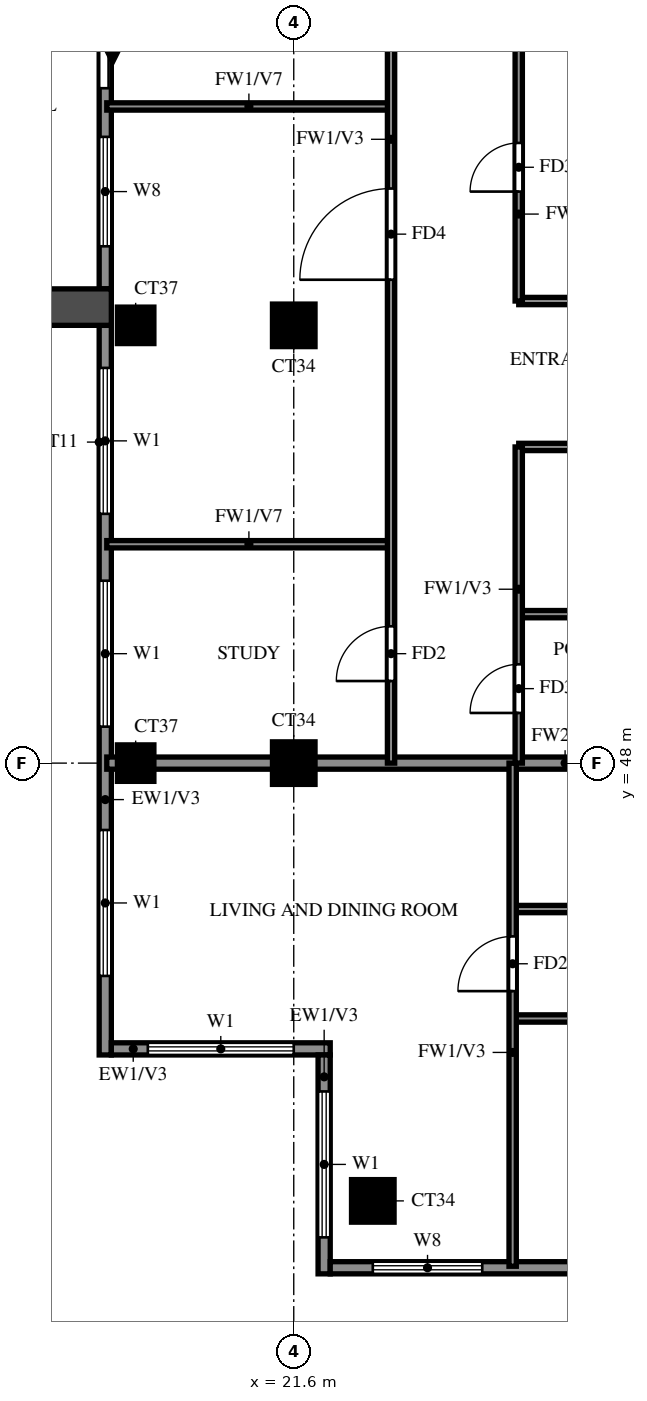
"""IFC4 building model, lengths in metres.
Left out: names, types, materials, properties, quantities, classifications, styles, units other than length and angle.
Written with IfcOpenShell. Run it as: python <this file> out.ifc"""

import sys

from ifc_helpers import new_model, si_unit, direction, frame, frame_2d, origin, origin_2d, place, context, subcontext, project, spatial, rectangle, extrude, source, transform, mapped, element, fill, save


model = new_model("IFC4")
c1 = context("Model", 3, precision=1e-05, world=origin(), true_north=direction((0.0, 1.0)))
c2 = subcontext(c1, "Body", "Model", "MODEL_VIEW")
j1 = project(units=[si_unit("LENGTHUNIT", "METRE"), si_unit("PLANEANGLEUNIT", "RADIAN")], contexts=[c1])
p1 = place(None, origin())
s1 = spatial("IfcSite", under=j1, at=p1, CompositionType="ELEMENT")
p2 = place(p1, origin())
s2 = spatial("IfcBuilding", under=s1, at=p2, CompositionType="ELEMENT")
p3 = place(p2, frame((0.0, 0.0, 264.0)))
s3 = spatial("IfcBuildingStorey", under=s2, at=p3, CompositionType="ELEMENT", Elevation=264.0)
m1 = source(origin(), c2, "Body", "SweptSolid", [
    extrude(rectangle(XDim=0.7, YDim=0.7, at=origin_2d()), origin(), (0.0, 0.0, 1.0), 3.22),
])
p4 = place(p3, frame((22.9, 40.8, 0.0), z_axis=(0.0, 0.0, 1.0), x_axis=(1.0, 0.0, 0.0)))
e1 = element("IfcColumn", 1, at=p4, inside=s3, PredefinedType="COLUMN", context=c2, shape_type="MappedRepresentation", body=[
    mapped(m1, transform((0.0, 0.0, 0.0))),
])
m2 = source(origin(), c2, "Body", "SweptSolid", [
    extrude(rectangle(XDim=0.6, YDim=0.6, at=origin_2d()), origin(), (0.0, 0.0, 1.0), 3.22),
])
p5 = place(p3, frame((19.0, 48.0, 0.0), z_axis=(0.0, 0.0, 1.0), x_axis=(1.0, 0.0, 0.0)))
e2 = element("IfcColumn", 2, at=p5, inside=s3, PredefinedType="COLUMN", context=c2, shape_type="MappedRepresentation", body=[
    mapped(m2, transform((0.0, 0.0, 0.0))),
])
p6 = place(p3, frame((21.6, 48.0, 0.0), z_axis=(0.0, 0.0, 1.0), x_axis=(1.0, 0.0, 0.0)))
e3 = element("IfcColumn", 3, at=p6, inside=s3, PredefinedType="COLUMN", context=c2, shape_type="MappedRepresentation", body=[
    mapped(m1, transform((0.0, 0.0, 0.0))),
])
p7 = place(p3, frame((19.0, 55.2, 0.0), z_axis=(0.0, 0.0, 1.0), x_axis=(1.0, 0.0, 0.0)))
e4 = element("IfcColumn", 4, at=p7, inside=s3, PredefinedType="COLUMN", context=c2, shape_type="MappedRepresentation", body=[
    mapped(m2, transform((0.0, 0.0, 0.0))),
])
p8 = place(p3, frame((21.6, 55.2, 0.0), z_axis=(0.0, 0.0, 1.0), x_axis=(1.0, 0.0, 0.0)))
e5 = element("IfcColumn", 5, at=p8, inside=s3, PredefinedType="COLUMN", context=c2, shape_type="MappedRepresentation", body=[
    mapped(m1, transform((0.0, 0.0, 0.0))),
])
p9 = place(p3, frame((18.5, 61.8, 0.0), z_axis=(0.0, 0.0, 1.0), x_axis=(0.0, -1.0, 0.0)))
e6 = element("IfcWall", 6, at=p9, inside=s3, PredefinedType="SOLIDWALL", context=c2, shape_type="SweptSolid", body=[
    extrude(rectangle(XDim=6.0, YDim=0.2, at=frame_2d((3.0, 0.0))), origin(), (0.0, 0.0, 1.0), 3.22),
])
p10 = place(p9, frame((0.9, 0.0, 0.0)))
e7 = element("IfcOpeningElement", 7, at=p10, cuts=e6, PredefinedType="OPENING", context=c2, shape_type="SweptSolid", body=[
    extrude(rectangle(XDim=1.8, YDim=2.4, at=frame_2d((0.9, 1.2))), frame((0.0, 0.11, 0.0), z_axis=(0.0, -1.0, 0.0), x_axis=(1.0, 0.0, 0.0)), (0.0, 0.0, 1.0), 0.22),
])
p11 = place(p9, frame((3.5, 0.0, 0.6)))
e8 = element("IfcOpeningElement", 8, at=p11, cuts=e6, PredefinedType="OPENING", context=c2, shape_type="SweptSolid", body=[
    extrude(rectangle(XDim=1.8, YDim=2.4, at=frame_2d((0.9, 1.2))), frame((0.0, 0.11, 0.0), z_axis=(0.0, -1.0, 0.0), x_axis=(1.0, 0.0, 0.0)), (0.0, 0.0, 1.0), 0.22),
])
p12 = place(p3, frame((18.5, 55.2, 0.0), z_axis=(0.0, 0.0, 1.0), x_axis=(0.0, -1.0, 0.0)))
e9 = element("IfcWall", 9, at=p12, inside=s3, PredefinedType="SOLIDWALL", context=c2, shape_type="SweptSolid", body=[
    extrude(rectangle(XDim=12.0, YDim=0.2, at=frame_2d((6.0, 0.0))), origin(), (0.0, 0.0, 1.0), 3.22),
])
p13 = place(p12, frame((8.3, 0.0, 0.6)))
e10 = element("IfcOpeningElement", 10, at=p13, cuts=e9, PredefinedType="OPENING", context=c2, shape_type="SweptSolid", body=[
    extrude(rectangle(XDim=2.4, YDim=2.4, at=frame_2d((1.2, 1.2))), frame((0.0, 0.11, 0.0), z_axis=(0.0, -1.0, 0.0), x_axis=(1.0, 0.0, 0.0)), (0.0, 0.0, 1.0), 0.22),
])
p14 = place(p12, frame((4.2, 0.0, 0.6)))
e11 = element("IfcOpeningElement", 11, at=p14, cuts=e9, PredefinedType="OPENING", context=c2, shape_type="SweptSolid", body=[
    extrude(rectangle(XDim=2.4, YDim=2.4, at=frame_2d((1.2, 1.2))), frame((0.0, 0.11, 0.0), z_axis=(0.0, -1.0, 0.0), x_axis=(1.0, 0.0, 0.0)), (0.0, 0.0, 1.0), 0.22),
])
p15 = place(p12, frame((0.7, 0.0, 0.6)))
e12 = element("IfcOpeningElement", 12, at=p15, cuts=e9, PredefinedType="OPENING", context=c2, shape_type="SweptSolid", body=[
    extrude(rectangle(XDim=2.4, YDim=2.4, at=frame_2d((1.2, 1.2))), frame((0.0, 0.11, 0.0), z_axis=(0.0, -1.0, 0.0), x_axis=(1.0, 0.0, 0.0)), (0.0, 0.0, 1.0), 0.22),
])
p16 = place(p3, frame((18.6, 43.3, 0.0), z_axis=(0.0, 0.0, 1.0), x_axis=(1.0, 0.0, 0.0)))
e13 = element("IfcWall", 13, at=p16, inside=s3, PredefinedType="SOLIDWALL", context=c2, shape_type="SweptSolid", body=[
    extrude(rectangle(XDim=3.6, YDim=0.2, at=frame_2d((1.8, 0.0))), origin(), (0.0, 0.0, 1.0), 3.22),
])
p17 = place(p16, frame((0.6, 0.0, 0.6)))
e14 = element("IfcOpeningElement", 14, at=p17, cuts=e13, PredefinedType="OPENING", context=c2, shape_type="SweptSolid", body=[
    extrude(rectangle(XDim=2.4, YDim=2.4, at=frame_2d((1.2, 1.2))), frame((0.0, 0.11, 0.0), z_axis=(0.0, -1.0, 0.0), x_axis=(1.0, 0.0, 0.0)), (0.0, 0.0, 1.0), 0.22),
])
p18 = place(p3, frame((22.1, 43.2, 0.0), z_axis=(0.0, 0.0, 1.0), x_axis=(0.0, -1.0, 0.0)))
e15 = element("IfcWall", 15, at=p18, inside=s3, PredefinedType="SOLIDWALL", context=c2, shape_type="SweptSolid", body=[
    extrude(rectangle(XDim=3.6, YDim=0.2, at=frame_2d((1.8, 0.0))), origin(), (0.0, 0.0, 1.0), 3.22),
])
p19 = place(p18, frame((0.6, 0.0, 0.6)))
e16 = element("IfcOpeningElement", 16, at=p19, cuts=e15, PredefinedType="OPENING", context=c2, shape_type="SweptSolid", body=[
    extrude(rectangle(XDim=2.4, YDim=2.4, at=frame_2d((1.2, 1.2))), frame((0.0, 0.11, 0.0), z_axis=(0.0, -1.0, 0.0), x_axis=(1.0, 0.0, 0.0)), (0.0, 0.0, 1.0), 0.22),
])
p20 = place(p3, frame((22.2, 39.7, 0.0), z_axis=(0.0, 0.0, 1.0), x_axis=(1.0, 0.0, 0.0)))
e17 = element("IfcWall", 17, at=p20, inside=s3, PredefinedType="SOLIDWALL", context=c2, shape_type="SweptSolid", body=[
    extrude(rectangle(XDim=19.8, YDim=0.2, at=frame_2d((9.9, 0.0))), origin(), (0.0, 0.0, 1.0), 3.22),
])
p21 = place(p20, frame((0.7, 0.0, 0.6)))
e18 = element("IfcOpeningElement", 18, at=p21, cuts=e17, PredefinedType="OPENING", context=c2, shape_type="SweptSolid", body=[
    extrude(rectangle(XDim=1.8, YDim=2.4, at=frame_2d((0.9, 1.2))), frame((0.0, 0.11, 0.0), z_axis=(0.0, -1.0, 0.0), x_axis=(1.0, 0.0, 0.0)), (0.0, 0.0, 1.0), 0.22),
])
p22 = place(p20, frame((4.35, 0.0, 1.5)))
e19 = element("IfcOpeningElement", 19, at=p22, cuts=e17, PredefinedType="OPENING", context=c2, shape_type="SweptSolid", body=[
    extrude(rectangle(XDim=0.9, YDim=0.9, at=frame_2d((0.45, 0.45))), frame((0.0, 0.11, 0.0), z_axis=(0.0, -1.0, 0.0), x_axis=(1.0, 0.0, 0.0)), (0.0, 0.0, 1.0), 0.22),
])
p23 = place(p20, frame((7.8, 0.0, 0.6)))
e20 = element("IfcOpeningElement", 20, at=p23, cuts=e17, PredefinedType="OPENING", context=c2, shape_type="SweptSolid", body=[
    extrude(rectangle(XDim=2.4, YDim=2.4, at=frame_2d((1.2, 1.2))), frame((0.0, 0.11, 0.0), z_axis=(0.0, -1.0, 0.0), x_axis=(1.0, 0.0, 0.0)), (0.0, 0.0, 1.0), 0.22),
])
p24 = place(p3, frame((18.6, 55.5, 0.0), z_axis=(0.0, 0.0, 1.0), x_axis=(-1.0, 0.0, 0.0)))
e21 = element("IfcWall", 21, at=p24, inside=s3, PredefinedType="SOLIDWALL", context=c2, shape_type="SweptSolid", body=[
    extrude(rectangle(XDim=2.9, YDim=0.6, at=frame_2d((1.45, 0.0))), origin(), (0.0, 0.0, 1.0), 2.85),
])
p25 = place(p3, frame((18.525, 48.0, 0.0), z_axis=(0.0, 0.0, 1.0), x_axis=(1.0, 0.0, 0.0)))
e22 = element("IfcWall", 22, at=p25, inside=s3, PredefinedType="SOLIDWALL", context=c2, shape_type="SweptSolid", body=[
    extrude(rectangle(XDim=15.075, YDim=0.2, at=frame_2d((7.538, 0.0))), origin(), (0.0, 0.0, 1.0), 3.22),
])
p26 = place(p3, frame((25.2, 43.8, 0.0), z_axis=(0.0, 0.0, 1.0), x_axis=(1.0, 0.0, 0.0)))
e23 = element("IfcWall", 23, at=p26, inside=s3, PredefinedType="PARTITIONING", context=c2, shape_type="SweptSolid", body=[
    extrude(rectangle(XDim=8.4, YDim=0.12, at=frame_2d((4.2, 0.0))), origin(), (0.0, 0.0, 1.0), 3.22),
])
p27 = place(p26, frame((1.35, 0.0, 0.0)))
e24 = element("IfcOpeningElement", 24, at=p27, cuts=e23, PredefinedType="OPENING", context=c2, shape_type="SweptSolid", body=[
    extrude(rectangle(XDim=0.9, YDim=2.1, at=frame_2d((0.45, 1.05))), frame((0.0, 0.07, 0.0), z_axis=(0.0, -1.0, 0.0), x_axis=(1.0, 0.0, 0.0)), (0.0, 0.0, 1.0), 0.14),
])
p28 = place(p26, frame((5.55, 0.0, 0.0)))
e25 = element("IfcOpeningElement", 25, at=p28, cuts=e23, PredefinedType="OPENING", context=c2, shape_type="SweptSolid", body=[
    extrude(rectangle(XDim=0.9, YDim=2.1, at=frame_2d((0.45, 1.05))), frame((0.0, 0.07, 0.0), z_axis=(0.0, -1.0, 0.0), x_axis=(1.0, 0.0, 0.0)), (0.0, 0.0, 1.0), 0.14),
])
p29 = place(p3, frame((25.2, 45.6, 0.0), z_axis=(0.0, 0.0, 1.0), x_axis=(1.0, 0.0, 0.0)))
e26 = element("IfcWall", 26, at=p29, inside=s3, PredefinedType="PARTITIONING", context=c2, shape_type="SweptSolid", body=[
    extrude(rectangle(XDim=6.0, YDim=0.12, at=frame_2d((3.0, 0.0))), origin(), (0.0, 0.0, 1.0), 3.22),
])
p30 = place(p29, frame((2.55, 0.0, 0.0)))
e27 = element("IfcOpeningElement", 27, at=p30, cuts=e26, PredefinedType="OPENING", context=c2, shape_type="SweptSolid", body=[
    extrude(rectangle(XDim=0.9, YDim=2.1, at=frame_2d((0.45, 1.05))), frame((0.0, 0.07, 0.0), z_axis=(0.0, -1.0, 0.0), x_axis=(1.0, 0.0, 0.0)), (0.0, 0.0, 1.0), 0.14),
])
p31 = place(p3, frame((25.3, 50.45, 0.0), z_axis=(0.0, 0.0, 1.0), x_axis=(1.0, 0.0, 0.0)))
e28 = element("IfcWall", 28, at=p31, inside=s3, PredefinedType="PARTITIONING", context=c2, shape_type="SweptSolid", body=[
    extrude(rectangle(XDim=3.5, YDim=0.12, at=frame_2d((1.75, 0.0))), origin(), (0.0, 0.0, 1.0), 3.22),
])
p32 = place(p3, frame((18.525, 51.6, 0.0), z_axis=(0.0, 0.0, 1.0), x_axis=(1.0, 0.0, 0.0)))
e29 = element("IfcWall", 29, at=p32, inside=s3, PredefinedType="PARTITIONING", context=c2, shape_type="SweptSolid", body=[
    extrude(rectangle(XDim=4.675, YDim=0.12, at=frame_2d((2.337, 0.0))), origin(), (0.0, 0.0, 1.0), 2.32),
])
p33 = place(p3, frame((25.3, 53.2, 0.0), z_axis=(0.0, 0.0, 1.0), x_axis=(1.0, 0.0, 0.0)))
e30 = element("IfcWall", 30, at=p33, inside=s3, PredefinedType="PARTITIONING", context=c2, shape_type="SweptSolid", body=[
    extrude(rectangle(XDim=8.3, YDim=0.12, at=frame_2d((4.15, 0.0))), origin(), (0.0, 0.0, 1.0), 3.22),
])
p34 = place(p33, frame((1.3, 0.0, 0.0)))
e31 = element("IfcOpeningElement", 31, at=p34, cuts=e30, PredefinedType="OPENING", context=c2, shape_type="SweptSolid", body=[
    extrude(rectangle(XDim=0.9, YDim=2.1, at=frame_2d((0.45, 1.05))), frame((0.0, 0.07, 0.0), z_axis=(0.0, -1.0, 0.0), x_axis=(1.0, 0.0, 0.0)), (0.0, 0.0, 1.0), 0.14),
])
p35 = place(p33, frame((5.45, 0.0, 0.0)))
e32 = element("IfcOpeningElement", 32, at=p35, cuts=e30, PredefinedType="OPENING", context=c2, shape_type="SweptSolid", body=[
    extrude(rectangle(XDim=0.9, YDim=2.1, at=frame_2d((0.45, 1.05))), frame((0.0, 0.07, 0.0), z_axis=(0.0, -1.0, 0.0), x_axis=(1.0, 0.0, 0.0)), (0.0, 0.0, 1.0), 0.14),
])
p36 = place(p3, frame((25.3, 55.6, 0.0), z_axis=(0.0, 0.0, 1.0), x_axis=(1.0, 0.0, 0.0)))
e33 = element("IfcWall", 33, at=p36, inside=s3, PredefinedType="PARTITIONING", context=c2, shape_type="SweptSolid", body=[
    extrude(rectangle(XDim=8.3, YDim=0.12, at=frame_2d((4.15, 0.0))), origin(), (0.0, 0.0, 1.0), 3.22),
])
p37 = place(p36, frame((5.45, 0.0, 0.0)))
e34 = element("IfcOpeningElement", 34, at=p37, cuts=e33, PredefinedType="OPENING", context=c2, shape_type="SweptSolid", body=[
    extrude(rectangle(XDim=0.9, YDim=2.1, at=frame_2d((0.45, 1.05))), frame((0.0, 0.07, 0.0), z_axis=(0.0, -1.0, 0.0), x_axis=(1.0, 0.0, 0.0)), (0.0, 0.0, 1.0), 0.14),
])
p38 = place(p3, frame((18.525, 58.8, 0.0), z_axis=(0.0, 0.0, 1.0), x_axis=(1.0, 0.0, 0.0)))
e35 = element("IfcWall", 35, at=p38, inside=s3, PredefinedType="PARTITIONING", context=c2, shape_type="SweptSolid", body=[
    extrude(rectangle(XDim=4.675, YDim=0.12, at=frame_2d((2.337, 0.0))), origin(), (0.0, 0.0, 1.0), 2.32),
])
p39 = place(p3, frame((23.2, 48.0, 0.0), z_axis=(0.0, 0.0, 1.0), x_axis=(0.0, 1.0, 0.0)))
e36 = element("IfcWall", 36, at=p39, inside=s3, PredefinedType="PARTITIONING", context=c2, shape_type="SweptSolid", body=[
    extrude(rectangle(XDim=21.6, YDim=0.12, at=frame_2d((10.8, 0.0))), origin(), (0.0, 0.0, 1.0), 3.22),
])
p40 = place(p39, frame((1.35, 0.0, 0.0)))
e37 = element("IfcOpeningElement", 37, at=p40, cuts=e36, PredefinedType="OPENING", context=c2, shape_type="SweptSolid", body=[
    extrude(rectangle(XDim=0.9, YDim=2.1, at=frame_2d((0.45, 1.05))), frame((0.0, 0.07, 0.0), z_axis=(0.0, -1.0, 0.0), x_axis=(1.0, 0.0, 0.0)), (0.0, 0.0, 1.0), 0.14),
])
p41 = place(p39, frame((7.95, 0.0, 0.0)))
e38 = element("IfcOpeningElement", 38, at=p41, cuts=e36, PredefinedType="OPENING", context=c2, shape_type="SweptSolid", body=[
    extrude(rectangle(XDim=1.5, YDim=2.1, at=frame_2d((0.75, 1.05))), frame((0.0, 0.07, 0.0), z_axis=(0.0, -1.0, 0.0), x_axis=(1.0, 0.0, 0.0)), (0.0, 0.0, 1.0), 0.14),
])
p42 = place(p39, frame((12.15, 0.0, 0.0)))
e39 = element("IfcOpeningElement", 39, at=p42, cuts=e36, PredefinedType="OPENING", context=c2, shape_type="SweptSolid", body=[
    extrude(rectangle(XDim=0.9, YDim=2.1, at=frame_2d((0.45, 1.05))), frame((0.0, 0.07, 0.0), z_axis=(0.0, -1.0, 0.0), x_axis=(1.0, 0.0, 0.0)), (0.0, 0.0, 1.0), 0.14),
])
p43 = place(p39, frame((15.75, 0.0, 0.0)))
e40 = element("IfcOpeningElement", 40, at=p43, cuts=e36, PredefinedType="OPENING", context=c2, shape_type="SweptSolid", body=[
    extrude(rectangle(XDim=0.9, YDim=2.1, at=frame_2d((0.45, 1.05))), frame((0.0, 0.07, 0.0), z_axis=(0.0, -1.0, 0.0), x_axis=(1.0, 0.0, 0.0)), (0.0, 0.0, 1.0), 0.14),
])
p44 = place(p39, frame((19.35, 0.0, 0.0)))
e41 = element("IfcOpeningElement", 41, at=p44, cuts=e36, PredefinedType="OPENING", context=c2, shape_type="SweptSolid", body=[
    extrude(rectangle(XDim=0.9, YDim=2.1, at=frame_2d((0.45, 1.05))), frame((0.0, 0.07, 0.0), z_axis=(0.0, -1.0, 0.0), x_axis=(1.0, 0.0, 0.0)), (0.0, 0.0, 1.0), 0.14),
])
p45 = place(p3, frame((25.2, 39.725, 0.0), z_axis=(0.0, 0.0, 1.0), x_axis=(0.0, 1.0, 0.0)))
e42 = element("IfcWall", 42, at=p45, inside=s3, PredefinedType="PARTITIONING", context=c2, shape_type="SweptSolid", body=[
    extrude(rectangle(XDim=8.275, YDim=0.12, at=frame_2d((4.137, 0.0))), origin(), (0.0, 0.0, 1.0), 3.22),
])
p46 = place(p45, frame((4.525, 0.0, 0.0)))
e43 = element("IfcOpeningElement", 43, at=p46, cuts=e42, PredefinedType="OPENING", context=c2, shape_type="SweptSolid", body=[
    extrude(rectangle(XDim=0.9, YDim=2.1, at=frame_2d((0.45, 1.05))), frame((0.0, 0.07, 0.0), z_axis=(0.0, -1.0, 0.0), x_axis=(1.0, 0.0, 0.0)), (0.0, 0.0, 1.0), 0.14),
])
p47 = place(p3, frame((25.3, 48.0, 0.0), z_axis=(0.0, 0.0, 1.0), x_axis=(0.0, 1.0, 0.0)))
e44 = element("IfcWall", 44, at=p47, inside=s3, PredefinedType="PARTITIONING", context=c2, shape_type="SweptSolid", body=[
    extrude(rectangle(XDim=5.2, YDim=0.12, at=frame_2d((2.6, 0.0))), origin(), (0.0, 0.0, 1.0), 3.22),
])
p48 = place(p47, frame((0.825, 0.0, 0.0)))
e45 = element("IfcOpeningElement", 45, at=p48, cuts=e44, PredefinedType="OPENING", context=c2, shape_type="SweptSolid", body=[
    extrude(rectangle(XDim=0.8, YDim=2.1, at=frame_2d((0.4, 1.05))), frame((0.0, 0.07, 0.0), z_axis=(0.0, -1.0, 0.0), x_axis=(1.0, 0.0, 0.0)), (0.0, 0.0, 1.0), 0.14),
])
p49 = place(p3, frame((25.3, 55.6, 0.0), z_axis=(0.0, 0.0, 1.0), x_axis=(0.0, 1.0, 0.0)))
e46 = element("IfcWall", 46, at=p49, inside=s3, PredefinedType="PARTITIONING", context=c2, shape_type="SweptSolid", body=[
    extrude(rectangle(XDim=4.4, YDim=0.12, at=frame_2d((2.2, 0.0))), origin(), (0.0, 0.0, 1.0), 3.22),
])
p50 = place(p49, frame((1.8, 0.0, 0.0)))
e47 = element("IfcOpeningElement", 47, at=p50, cuts=e46, PredefinedType="OPENING", context=c2, shape_type="SweptSolid", body=[
    extrude(rectangle(XDim=0.8, YDim=2.1, at=frame_2d((0.4, 1.05))), frame((0.0, 0.07, 0.0), z_axis=(0.0, -1.0, 0.0), x_axis=(1.0, 0.0, 0.0)), (0.0, 0.0, 1.0), 0.14),
])
p51 = place(p10, origin())
e48 = element("IfcDoor", 48, at=p51, inside=s3, OperationType="DOUBLE_DOOR_SLIDING", PredefinedType="DOOR", context=c2, shape_type="SweptSolid", body=[
    extrude(rectangle(XDim=1.8, YDim=2.4, at=frame_2d((0.9, 1.2))), frame((0.0, 0.025, 0.0), z_axis=(0.0, -1.0, 0.0), x_axis=(1.0, 0.0, 0.0)), (0.0, 0.0, 1.0), 0.05),
])
fill(e7, e48)
p52 = place(p11, origin())
e49 = element("IfcWindow", 49, at=p52, inside=s3, PartitioningType="DOUBLE_PANEL_VERTICAL", PredefinedType="WINDOW", context=c2, shape_type="SweptSolid", body=[
    extrude(rectangle(XDim=1.8, YDim=2.4, at=frame_2d((0.9, 1.2))), frame((0.0, 0.03, 0.0), z_axis=(0.0, -1.0, 0.0), x_axis=(1.0, 0.0, 0.0)), (0.0, 0.0, 1.0), 0.06),
])
fill(e8, e49)
p53 = place(p13, origin())
e50 = element("IfcWindow", 50, at=p53, inside=s3, PartitioningType="DOUBLE_PANEL_VERTICAL", PredefinedType="WINDOW", context=c2, shape_type="SweptSolid", body=[
    extrude(rectangle(XDim=2.4, YDim=2.4, at=frame_2d((1.2, 1.2))), frame((0.0, 0.03, 0.0), z_axis=(0.0, -1.0, 0.0), x_axis=(1.0, 0.0, 0.0)), (0.0, 0.0, 1.0), 0.06),
])
fill(e10, e50)
p54 = place(p14, origin())
e51 = element("IfcWindow", 51, at=p54, inside=s3, PartitioningType="DOUBLE_PANEL_VERTICAL", PredefinedType="WINDOW", context=c2, shape_type="SweptSolid", body=[
    extrude(rectangle(XDim=2.4, YDim=2.4, at=frame_2d((1.2, 1.2))), frame((0.0, 0.03, 0.0), z_axis=(0.0, -1.0, 0.0), x_axis=(1.0, 0.0, 0.0)), (0.0, 0.0, 1.0), 0.06),
])
fill(e11, e51)
p55 = place(p15, origin())
e52 = element("IfcWindow", 52, at=p55, inside=s3, PartitioningType="DOUBLE_PANEL_VERTICAL", PredefinedType="WINDOW", context=c2, shape_type="SweptSolid", body=[
    extrude(rectangle(XDim=2.4, YDim=2.4, at=frame_2d((1.2, 1.2))), frame((0.0, 0.03, 0.0), z_axis=(0.0, -1.0, 0.0), x_axis=(1.0, 0.0, 0.0)), (0.0, 0.0, 1.0), 0.06),
])
fill(e12, e52)
p56 = place(p17, origin())
e53 = element("IfcWindow", 53, at=p56, inside=s3, PartitioningType="DOUBLE_PANEL_VERTICAL", PredefinedType="WINDOW", context=c2, shape_type="SweptSolid", body=[
    extrude(rectangle(XDim=2.4, YDim=2.4, at=frame_2d((1.2, 1.2))), frame((0.0, 0.03, 0.0), z_axis=(0.0, -1.0, 0.0), x_axis=(1.0, 0.0, 0.0)), (0.0, 0.0, 1.0), 0.06),
])
fill(e14, e53)
p57 = place(p19, origin())
e54 = element("IfcWindow", 54, at=p57, inside=s3, PartitioningType="DOUBLE_PANEL_VERTICAL", PredefinedType="WINDOW", context=c2, shape_type="SweptSolid", body=[
    extrude(rectangle(XDim=2.4, YDim=2.4, at=frame_2d((1.2, 1.2))), frame((0.0, 0.03, 0.0), z_axis=(0.0, -1.0, 0.0), x_axis=(1.0, 0.0, 0.0)), (0.0, 0.0, 1.0), 0.06),
])
fill(e16, e54)
p58 = place(p21, origin())
e55 = element("IfcWindow", 55, at=p58, inside=s3, PartitioningType="DOUBLE_PANEL_VERTICAL", PredefinedType="WINDOW", context=c2, shape_type="SweptSolid", body=[
    extrude(rectangle(XDim=1.8, YDim=2.4, at=frame_2d((0.9, 1.2))), frame((0.0, 0.03, 0.0), z_axis=(0.0, -1.0, 0.0), x_axis=(1.0, 0.0, 0.0)), (0.0, 0.0, 1.0), 0.06),
])
fill(e18, e55)
p59 = place(p46, origin())
e56 = element("IfcDoor", 56, at=p59, inside=s3, OperationType="SINGLE_SWING_RIGHT", PredefinedType="DOOR", context=c2, shape_type="SweptSolid", body=[
    extrude(rectangle(XDim=0.9, YDim=2.1, at=frame_2d((0.45, 1.05))), frame((0.0, 0.025, 0.0), z_axis=(0.0, -1.0, 0.0), x_axis=(1.0, 0.0, 0.0)), (0.0, 0.0, 1.0), 0.05),
])
fill(e43, e56)
p60 = place(p40, origin())
e57 = element("IfcDoor", 57, at=p60, inside=s3, OperationType="SINGLE_SWING_RIGHT", PredefinedType="DOOR", context=c2, shape_type="SweptSolid", body=[
    extrude(rectangle(XDim=0.9, YDim=2.1, at=frame_2d((0.45, 1.05))), frame((0.0, 0.025, 0.0), z_axis=(0.0, -1.0, 0.0), x_axis=(1.0, 0.0, 0.0)), (0.0, 0.0, 1.0), 0.05),
])
fill(e37, e57)
p61 = place(p41, origin())
e58 = element("IfcDoor", 58, at=p61, inside=s3, OperationType="SINGLE_SWING_RIGHT", PredefinedType="DOOR", context=c2, shape_type="SweptSolid", body=[
    extrude(rectangle(XDim=1.5, YDim=2.1, at=frame_2d((0.75, 1.05))), frame((0.0, 0.025, 0.0), z_axis=(0.0, -1.0, 0.0), x_axis=(1.0, 0.0, 0.0)), (0.0, 0.0, 1.0), 0.05),
])
fill(e38, e58)
p62 = place(p48, origin())
e59 = element("IfcDoor", 59, at=p62, inside=s3, OperationType="SINGLE_SWING_RIGHT", PredefinedType="DOOR", context=c2, shape_type="SweptSolid", body=[
    extrude(rectangle(XDim=0.8, YDim=2.1, at=frame_2d((0.4, 1.05))), frame((0.0, 0.025, 0.0), z_axis=(0.0, -1.0, 0.0), x_axis=(1.0, 0.0, 0.0)), (0.0, 0.0, 1.0), 0.05),
])
fill(e45, e59)
p63 = place(p50, origin())
e60 = element("IfcDoor", 60, at=p63, inside=s3, OperationType="SINGLE_SWING_LEFT", PredefinedType="DOOR", context=c2, shape_type="SweptSolid", body=[
    extrude(rectangle(XDim=0.8, YDim=2.1, at=frame_2d((0.4, 1.05))), frame((0.0, 0.025, 0.0), z_axis=(0.0, -1.0, 0.0), x_axis=(1.0, 0.0, 0.0)), (0.0, 0.0, 1.0), 0.05),
])
fill(e47, e60)
save(model, sys.argv[1])
